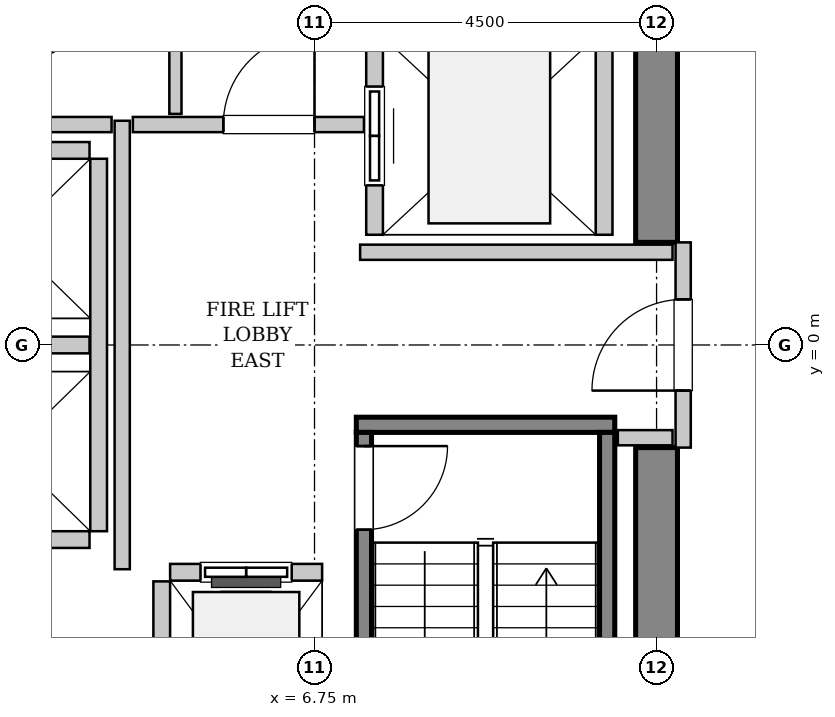
"""IFC4 building model, lengths in metres.
Left out: names, types, materials, properties, quantities, classifications, styles, units other than length and angle.
Written with IfcOpenShell. Run it as: python <this file> out.ifc"""

import sys

from ifc_helpers import new_model, si_unit, direction, frame, frame_2d, origin, place, context, subcontext, project, spatial, rectangle, extrude, source, transform, mapped, element, fill, save


model = new_model("IFC4")
c1 = context("Model", 3, precision=1e-05, world=origin(), true_north=direction((0.0, 1.0)))
c2 = subcontext(c1, "Body", "Model", "MODEL_VIEW")
j1 = project(units=[si_unit("LENGTHUNIT", "METRE"), si_unit("PLANEANGLEUNIT", "RADIAN")], contexts=[c1])
p1 = place(None, origin())
s1 = spatial("IfcSite", under=j1, at=p1, CompositionType="ELEMENT")
p2 = place(p1, origin())
s2 = spatial("IfcBuilding", under=s1, at=p2, CompositionType="ELEMENT")
p3 = place(p2, frame((0.0, 0.0, 156.4)))
s3 = spatial("IfcBuildingStorey", under=s2, at=p3, CompositionType="ELEMENT", Elevation=156.4)
m1 = source(origin(), c2, "Body", "SweptSolid", [
    extrude(rectangle(XDim=7.375, YDim=0.55, at=frame_2d((3.688, 0.0))), origin(), (0.0, 0.0, 1.0), 3.8),
])
for number, where, z_axis, x_axis in (
    (1, (11.25, -8.725, 0.0), (0.0, 0.0, 1.0), (0.0, 1.0, 0.0)),
    (2, (11.25, 1.35, 0.0), (0.0, 0.0, 1.0), (0.0, 1.0, 0.0)),
):
    element("IfcWall", number, at=place(p3, frame(where, z_axis=z_axis, x_axis=x_axis)), inside=s3, PredefinedType="SHEAR", context=c2, shape_type="MappedRepresentation", body=[
        mapped(m1, transform((0.0, 0.0, 0.0), x_axis=(1.0, 0.0, 0.0), y_axis=(0.0, 1.0, 0.0), z_axis=(0.0, 0.0, 1.0), scale=1.0)),
    ])
m2 = source(origin(), c2, "Body", "SweptSolid", [
    extrude(rectangle(XDim=3.4, YDim=0.2, at=frame_2d((1.7, 0.0))), origin(), (0.0, 0.0, 1.0), 3.8),
])
p4 = place(p3, frame((7.3, -1.05, 0.0), z_axis=(0.0, 0.0, 1.0), x_axis=(1.0, 0.0, 0.0)))
e3 = element("IfcWall", 3, at=p4, inside=s3, PredefinedType="SOLIDWALL", context=c2, shape_type="MappedRepresentation", body=[
    mapped(m2, transform((0.0, 0.0, 0.0), x_axis=(1.0, 0.0, 0.0), y_axis=(0.0, 1.0, 0.0), z_axis=(0.0, 0.0, 1.0), scale=1.0)),
])
m3 = source(origin(), c2, "Body", "SweptSolid", [
    extrude(rectangle(XDim=7.1, YDim=0.2, at=frame_2d((3.55, 0.0))), origin(), (0.0, 0.0, 1.0), 3.8),
])
p5 = place(p3, frame((7.4, -1.15, 0.0), z_axis=(0.0, 0.0, 1.0), x_axis=(0.0, -1.0, 0.0)))
e4 = element("IfcWall", 4, at=p5, inside=s3, PredefinedType="SOLIDWALL", context=c2, shape_type="MappedRepresentation", body=[
    mapped(m3, transform((0.0, 0.0, 0.0), x_axis=(1.0, 0.0, 0.0), y_axis=(0.0, 1.0, 0.0), z_axis=(0.0, 0.0, 1.0), scale=1.0)),
])
p6 = place(p5, frame((0.18, 0.0, 0.0)))
e5 = element("IfcOpeningElement", 5, at=p6, cuts=e4, PredefinedType="OPENING", context=c2, shape_type="SweptSolid", body=[
    extrude(rectangle(XDim=1.1, YDim=2.15, at=frame_2d((0.55, 1.075))), frame((0.0, 0.11, 0.0), z_axis=(0.0, -1.0, 0.0), x_axis=(1.0, 0.0, 0.0)), (0.0, 0.0, 1.0), 0.22),
])
p7 = place(p3, frame((10.6, -1.15, 0.0), z_axis=(0.0, 0.0, 1.0), x_axis=(0.0, -1.0, 0.0)))
e6 = element("IfcWall", 6, at=p7, inside=s3, PredefinedType="SOLIDWALL", context=c2, shape_type="MappedRepresentation", body=[
    mapped(m3, transform((0.0, 0.0, 0.0), x_axis=(1.0, 0.0, 0.0), y_axis=(0.0, 1.0, 0.0), z_axis=(0.0, 0.0, 1.0), scale=1.0)),
])
m4 = source(origin(), c2, "Body", "SweptSolid", [
    extrude(rectangle(XDim=2.0, YDim=0.22, at=frame_2d((1.0, 0.0))), origin(), (0.0, 0.0, 1.0), 3.535),
])
p8 = place(p3, frame((6.85, -2.99, 0.0), z_axis=(0.0, 0.0, 1.0), x_axis=(-1.0, 0.0, 0.0)))
e7 = element("IfcWall", 7, at=p8, inside=s3, PredefinedType="SOLIDWALL", context=c2, shape_type="MappedRepresentation", body=[
    mapped(m4, transform((0.0, 0.0, 0.0), x_axis=(1.0, 0.0, 0.0), y_axis=(0.0, 1.0, 0.0), z_axis=(0.0, 0.0, 1.0), scale=1.0)),
])
p9 = place(p8, frame((0.4, 0.0, 0.0)))
e8 = element("IfcOpeningElement", 8, at=p9, cuts=e7, PredefinedType="OPENING", context=c2, shape_type="SweptSolid", body=[
    extrude(rectangle(XDim=1.2, YDim=2.2, at=frame_2d((0.6, 1.1))), frame((0.0, 0.12, 0.0), z_axis=(0.0, -1.0, 0.0), x_axis=(1.0, 0.0, 0.0)), (0.0, 0.0, 1.0), 0.24),
])
m5 = source(origin(), c2, "Body", "SweptSolid", [
    extrude(rectangle(XDim=2.68, YDim=0.22, at=frame_2d((1.34, 0.0))), origin(), (0.0, 0.0, 1.0), 3.535),
])
p10 = place(p3, frame((4.74, -3.11, 0.0), z_axis=(0.0, 0.0, 1.0), x_axis=(0.0, -1.0, 0.0)))
e9 = element("IfcWall", 9, at=p10, inside=s3, PredefinedType="SOLIDWALL", context=c2, shape_type="MappedRepresentation", body=[
    mapped(m5, transform((0.0, 0.0, 0.0), x_axis=(1.0, 0.0, 0.0), y_axis=(0.0, 1.0, 0.0), z_axis=(0.0, 0.0, 1.0), scale=1.0)),
])
m6 = source(origin(), c2, "Body", "SweptSolid", [
    extrude(rectangle(XDim=5.45, YDim=0.22, at=frame_2d((2.725, 0.0))), origin(), (0.0, 0.0, 1.0), 3.535),
])
p11 = place(p3, frame((7.54, 6.9, 0.0), z_axis=(0.0, 0.0, 1.0), x_axis=(0.0, -1.0, 0.0)))
e10 = element("IfcWall", 10, at=p11, inside=s3, PredefinedType="SOLIDWALL", context=c2, shape_type="MappedRepresentation", body=[
    mapped(m6, transform((0.0, 0.0, 0.0), x_axis=(1.0, 0.0, 0.0), y_axis=(0.0, 1.0, 0.0), z_axis=(0.0, 0.0, 1.0), scale=1.0)),
])
p12 = place(p11, frame((3.5, 0.0, 0.0)))
e11 = element("IfcOpeningElement", 11, at=p12, cuts=e10, PredefinedType="OPENING", context=c2, shape_type="SweptSolid", body=[
    extrude(rectangle(XDim=1.3, YDim=2.3, at=frame_2d((0.65, 1.15))), frame((0.0, 0.12, 0.0), z_axis=(0.0, -1.0, 0.0), x_axis=(1.0, 0.0, 0.0)), (0.0, 0.0, 1.0), 0.24),
])
p13 = place(p11, frame((0.65, 0.0, 0.0)))
e12 = element("IfcOpeningElement", 12, at=p13, cuts=e10, PredefinedType="OPENING", context=c2, shape_type="SweptSolid", body=[
    extrude(rectangle(XDim=1.3, YDim=2.3, at=frame_2d((0.65, 1.15))), frame((0.0, 0.12, 0.0), z_axis=(0.0, -1.0, 0.0), x_axis=(1.0, 0.0, 0.0)), (0.0, 0.0, 1.0), 0.24),
])
p14 = place(p3, frame((10.56, 1.45, 0.0), z_axis=(0.0, 0.0, 1.0), x_axis=(0.0, 1.0, 0.0)))
e13 = element("IfcWall", 13, at=p14, inside=s3, PredefinedType="SOLIDWALL", context=c2, shape_type="MappedRepresentation", body=[
    mapped(m6, transform((0.0, 0.0, 0.0), x_axis=(1.0, 0.0, 0.0), y_axis=(0.0, 1.0, 0.0), z_axis=(0.0, 0.0, 1.0), scale=1.0)),
])
m7 = source(origin(), c2, "Body", "SweptSolid", [
    extrude(rectangle(XDim=4.9, YDim=0.22, at=frame_2d((2.45, 0.0))), origin(), (0.0, 0.0, 1.0), 3.535),
])
p15 = place(p3, frame((3.91, -2.45, 0.0), z_axis=(0.0, 0.0, 1.0), x_axis=(0.0, 1.0, 0.0)))
e14 = element("IfcWall", 14, at=p15, inside=s3, PredefinedType="SOLIDWALL", context=c2, shape_type="MappedRepresentation", body=[
    mapped(m7, transform((0.0, 0.0, 0.0), x_axis=(1.0, 0.0, 0.0), y_axis=(0.0, 1.0, 0.0), z_axis=(0.0, 0.0, 1.0), scale=1.0)),
])
m8 = source(origin(), c2, "Body", "SweptSolid", [
    extrude(rectangle(XDim=2.13, YDim=0.22, at=frame_2d((1.065, 0.0))), origin(), (0.0, 0.0, 1.0), 3.535),
])
for number, where, z_axis, x_axis in (
    (15, (1.66, -2.56, 0.0), (0.0, 0.0, 1.0), (1.0, 0.0, 0.0)),
    (16, (1.66, 0.0, 0.0), (0.0, 0.0, 1.0), (1.0, 0.0, 0.0)),
    (17, (3.79, 2.56, 0.0), (0.0, 0.0, 1.0), (-1.0, 0.0, 0.0)),
):
    element("IfcWall", number, at=place(p3, frame(where, z_axis=z_axis, x_axis=x_axis)), inside=s3, PredefinedType="SOLIDWALL", context=c2, shape_type="MappedRepresentation", body=[
        mapped(m8, transform((0.0, 0.0, 0.0), x_axis=(1.0, 0.0, 0.0), y_axis=(0.0, 1.0, 0.0), z_axis=(0.0, 0.0, 1.0), scale=1.0)),
    ])
m9 = source(origin(), c2, "Body", "SweptSolid", [
    extrude(rectangle(XDim=2.7, YDim=0.2, at=frame_2d((1.35, 0.0))), origin(), (0.0, 0.0, 1.0), 2.425),
])
p16 = place(p3, frame((11.6, -1.35, 0.0), z_axis=(0.0, 0.0, 1.0), x_axis=(0.0, 1.0, 0.0)))
e18 = element("IfcWall", 18, at=p16, inside=s3, PredefinedType="PARTITIONING", context=c2, shape_type="MappedRepresentation", body=[
    mapped(m9, transform((0.0, 0.0, 0.0), x_axis=(1.0, 0.0, 0.0), y_axis=(0.0, 1.0, 0.0), z_axis=(0.0, 0.0, 1.0), scale=1.0)),
])
p17 = place(p16, frame((0.75, 0.0, 0.0)))
e19 = element("IfcOpeningElement", 19, at=p17, cuts=e18, PredefinedType="OPENING", context=c2, shape_type="SweptSolid", body=[
    extrude(rectangle(XDim=1.2, YDim=2.15, at=frame_2d((0.6, 1.075))), frame((0.0, 0.11, 0.0), z_axis=(0.0, -1.0, 0.0), x_axis=(1.0, 0.0, 0.0)), (0.0, 0.0, 1.0), 0.22),
])
m10 = source(origin(), c2, "Body", "SweptSolid", [
    extrude(rectangle(XDim=5.9, YDim=0.2, at=frame_2d((2.95, 0.0))), origin(), (0.0, 0.0, 1.0), 3.535),
])
p18 = place(p3, frame((4.22, -2.95, 0.0), z_axis=(0.0, 0.0, 1.0), x_axis=(0.0, 1.0, 0.0)))
e20 = element("IfcWall", 20, at=p18, inside=s3, PredefinedType="PARTITIONING", context=c2, shape_type="MappedRepresentation", body=[
    mapped(m10, transform((0.0, 0.0, 0.0), x_axis=(1.0, 0.0, 0.0), y_axis=(0.0, 1.0, 0.0), z_axis=(0.0, 0.0, 1.0), scale=1.0)),
])
m11 = source(origin(), c2, "Body", "SweptSolid", [
    extrude(rectangle(XDim=2.52, YDim=0.2, at=frame_2d((1.26, 0.0))), origin(), (0.0, 0.0, 1.0), 3.535),
])
p19 = place(p3, frame((1.56, 2.9, 0.0), z_axis=(0.0, 0.0, 1.0), x_axis=(1.0, 0.0, 0.0)))
e21 = element("IfcWall", 21, at=p19, inside=s3, PredefinedType="PARTITIONING", context=c2, shape_type="MappedRepresentation", body=[
    mapped(m11, transform((0.0, 0.0, 0.0), x_axis=(1.0, 0.0, 0.0), y_axis=(0.0, 1.0, 0.0), z_axis=(0.0, 0.0, 1.0), scale=1.0)),
])
m12 = source(origin(), c2, "Body", "SweptSolid", [
    extrude(rectangle(XDim=3.04, YDim=0.2, at=frame_2d((1.52, 0.0))), origin(), (0.0, 0.0, 1.0), 3.535),
])
p20 = place(p3, frame((4.36, 2.9, 0.0), z_axis=(0.0, 0.0, 1.0), x_axis=(1.0, 0.0, 0.0)))
e22 = element("IfcWall", 22, at=p20, inside=s3, PredefinedType="PARTITIONING", context=c2, shape_type="MappedRepresentation", body=[
    mapped(m12, transform((0.0, 0.0, 0.0), x_axis=(1.0, 0.0, 0.0), y_axis=(0.0, 1.0, 0.0), z_axis=(0.0, 0.0, 1.0), scale=1.0)),
])
p21 = place(p20, frame((1.19, 0.0, 0.0)))
e23 = element("IfcOpeningElement", 23, at=p21, cuts=e22, PredefinedType="OPENING", context=c2, shape_type="SweptSolid", body=[
    extrude(rectangle(XDim=1.2, YDim=2.15, at=frame_2d((0.6, 1.075))), frame((0.0, 0.11, 0.0), z_axis=(0.0, -1.0, 0.0), x_axis=(1.0, 0.0, 0.0)), (0.0, 0.0, 1.0), 0.22),
])
m13 = source(origin(), c2, "Body", "SweptSolid", [
    extrude(rectangle(XDim=4.11, YDim=0.2, at=frame_2d((2.055, 0.0))), origin(), (0.0, 0.0, 1.0), 3.535),
])
p22 = place(p3, frame((7.35, 1.22, 0.0), z_axis=(0.0, 0.0, 1.0), x_axis=(1.0, 0.0, 0.0)))
e24 = element("IfcWall", 24, at=p22, inside=s3, PredefinedType="PARTITIONING", context=c2, shape_type="MappedRepresentation", body=[
    mapped(m13, transform((0.0, 0.0, 0.0), x_axis=(1.0, 0.0, 0.0), y_axis=(0.0, 1.0, 0.0), z_axis=(0.0, 0.0, 1.0), scale=1.0)),
])
m14 = source(origin(), c2, "Body", "SweptSolid", [
    extrude(rectangle(XDim=0.72, YDim=0.2, at=frame_2d((0.36, 0.0))), origin(), (0.0, 0.0, 1.0), 3.535),
])
p23 = place(p3, frame((10.74, -1.22, 0.0), z_axis=(0.0, 0.0, 1.0), x_axis=(1.0, 0.0, 0.0)))
e25 = element("IfcWall", 25, at=p23, inside=s3, PredefinedType="PARTITIONING", context=c2, shape_type="MappedRepresentation", body=[
    mapped(m14, transform((0.0, 0.0, 0.0), x_axis=(1.0, 0.0, 0.0), y_axis=(0.0, 1.0, 0.0), z_axis=(0.0, 0.0, 1.0), scale=1.0)),
])
m15 = source(origin(), c2, "Body", "SweptSolid", [
    extrude(rectangle(XDim=5.45, YDim=0.16, at=frame_2d((2.725, 0.0))), origin(), (0.0, 0.0, 1.0), 3.535),
])
p24 = place(p3, frame((4.92, 3.04, 0.0), z_axis=(0.0, 0.0, 1.0), x_axis=(0.0, 1.0, 0.0)))
e26 = element("IfcWall", 26, at=p24, inside=s3, PredefinedType="PARTITIONING", context=c2, shape_type="MappedRepresentation", body=[
    mapped(m15, transform((0.0, 0.0, 0.0), x_axis=(1.0, 0.0, 0.0), y_axis=(0.0, 1.0, 0.0), z_axis=(0.0, 0.0, 1.0), scale=1.0)),
])
m16 = source(origin(), c2, "Body", "SweptSolid", [
    extrude(rectangle(XDim=1.1, YDim=2.15, at=frame_2d((0.55, 1.075))), frame((0.0, 0.025, 0.0), z_axis=(0.0, -1.0, 0.0), x_axis=(1.0, 0.0, 0.0)), (0.0, 0.0, 1.0), 0.05),
])
p25 = place(p6, origin())
e27 = element("IfcDoor", 27, at=p25, inside=s3, OperationType="SINGLE_SWING_LEFT", PredefinedType="DOOR", context=c2, shape_type="MappedRepresentation", body=[
    mapped(m16, transform((0.0, 0.0, 0.0), x_axis=(1.0, 0.0, 0.0), y_axis=(0.0, 1.0, 0.0), z_axis=(0.0, 0.0, 1.0), scale=1.0)),
])
fill(e5, e27)
m17 = source(origin(), c2, "Body", "SweptSolid", [
    extrude(rectangle(XDim=1.2, YDim=2.2, at=frame_2d((0.6, 1.1))), frame((0.0, 0.025, 0.0), z_axis=(0.0, -1.0, 0.0), x_axis=(1.0, 0.0, 0.0)), (0.0, 0.0, 1.0), 0.05),
])
p26 = place(p9, origin())
e28 = element("IfcDoor", 28, at=p26, inside=s3, OperationType="SLIDING_TO_LEFT", PredefinedType="DOOR", context=c2, shape_type="MappedRepresentation", body=[
    mapped(m17, transform((0.0, 0.0, 0.0), x_axis=(1.0, 0.0, 0.0), y_axis=(0.0, 1.0, 0.0), z_axis=(0.0, 0.0, 1.0), scale=1.0)),
])
fill(e8, e28)
m18 = source(origin(), c2, "Body", "SweptSolid", [
    extrude(rectangle(XDim=1.3, YDim=2.3, at=frame_2d((0.65, 1.15))), frame((0.0, 0.025, 0.0), z_axis=(0.0, -1.0, 0.0), x_axis=(1.0, 0.0, 0.0)), (0.0, 0.0, 1.0), 0.05),
])
p27 = place(p12, origin())
e29 = element("IfcDoor", 29, at=p27, inside=s3, OperationType="SLIDING_TO_RIGHT", PredefinedType="DOOR", context=c2, shape_type="MappedRepresentation", body=[
    mapped(m18, transform((0.0, 0.0, 0.0), x_axis=(1.0, 0.0, 0.0), y_axis=(0.0, 1.0, 0.0), z_axis=(0.0, 0.0, 1.0), scale=1.0)),
])
fill(e11, e29)
m19 = source(origin(), c2, "Body", "SweptSolid", [
    extrude(rectangle(XDim=1.2, YDim=2.15, at=frame_2d((0.6, 1.075))), frame((0.0, 0.025, 0.0), z_axis=(0.0, -1.0, 0.0), x_axis=(1.0, 0.0, 0.0)), (0.0, 0.0, 1.0), 0.05),
])
p28 = place(p17, origin())
e30 = element("IfcDoor", 30, at=p28, inside=s3, OperationType="SINGLE_SWING_LEFT", PredefinedType="DOOR", context=c2, shape_type="MappedRepresentation", body=[
    mapped(m19, transform((0.0, 0.0, 0.0), x_axis=(1.0, 0.0, 0.0), y_axis=(0.0, 1.0, 0.0), z_axis=(0.0, 0.0, 1.0), scale=1.0)),
])
fill(e19, e30)
p29 = place(p21, origin())
e31 = element("IfcDoor", 31, at=p29, inside=s3, OperationType="SINGLE_SWING_RIGHT", PredefinedType="DOOR", context=c2, shape_type="MappedRepresentation", body=[
    mapped(m19, transform((0.0, 0.0, 0.0), x_axis=(1.0, 0.0, 0.0), y_axis=(0.0, 1.0, 0.0), z_axis=(0.0, 0.0, 1.0), scale=1.0)),
])
fill(e23, e31)
save(model, sys.argv[1])
